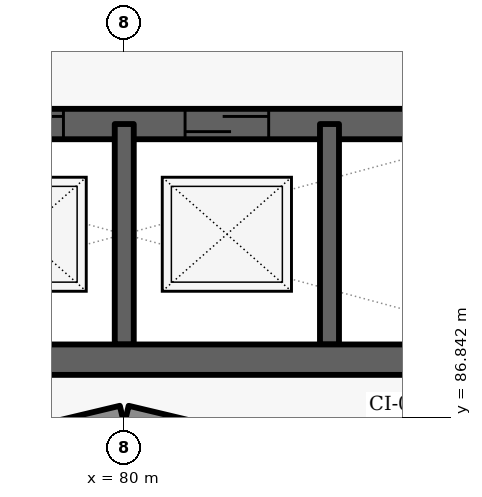
"""IFC4 building model, lengths in metres.
Left out: names, types, materials, properties, quantities, classifications, styles, units other than length and angle.
Written with IfcOpenShell. Run it as: python <this file> out.ifc"""

import sys

from ifc_helpers import new_model, si_unit, direction, frame, frame_2d, origin, place, context, subcontext, project, spatial, rectangle, extrude, element, fill, save


model = new_model("IFC4")
c1 = context("Model", 3, precision=1e-05, world=origin(), true_north=direction((0.0, 1.0)))
c2 = subcontext(c1, "Body", "Model", "MODEL_VIEW")
j1 = project(units=[si_unit("LENGTHUNIT", "METRE"), si_unit("PLANEANGLEUNIT", "RADIAN")], contexts=[c1])
p1 = place(None, origin())
s1 = spatial("IfcSite", under=j1, at=p1, CompositionType="ELEMENT")
p2 = place(p1, origin())
s2 = spatial("IfcBuilding", under=s1, at=p2, CompositionType="ELEMENT")
p3 = place(p2, frame((0.0, 0.0, 67.8)))
s3 = spatial("IfcBuildingStorey", under=s2, at=p3, CompositionType="ELEMENT", Elevation=67.8)
for number, where, z_axis, x_axis in (
    (1, (76.814, 86.119, 0.0), (0.0, 0.0, 1.0), (0.973, 0.232, 0.0)),
    (2, (80.029, 86.872, 0.0), (0.0, 0.0, 1.0), (0.973, -0.232, 0.0)),
):
    element("IfcWall", number, at=place(p3, frame(where, z_axis=z_axis, x_axis=x_axis)), inside=s3, PredefinedType="SOLIDWALL", context=c2, shape_type="SweptSolid", body=[
        extrude(rectangle(XDim=3.246, YDim=0.25, at=frame_2d((1.623, 0.0))), origin(), (0.0, 0.0, 1.0), 2.05),
    ])
p4 = place(p3, frame((74.6, 90.7, -0.275), z_axis=(0.0, 0.0, 1.0), x_axis=(1.0, 0.0, 0.0)))
e3 = element("IfcWall", 3, at=p4, inside=s3, PredefinedType="SHEAR", context=c2, shape_type="SweptSolid", body=[
    extrude(rectangle(XDim=10.8, YDim=0.4, at=frame_2d((5.4, 0.0))), origin(), (0.0, 0.0, 1.0), 3.225),
])
p5 = place(p4, frame((0.8, 0.0, 0.275)))
e4 = element("IfcOpeningElement", 4, at=p5, cuts=e3, PredefinedType="OPENING", context=c2, shape_type="SweptSolid", body=[
    extrude(rectangle(XDim=1.1, YDim=2.1, at=frame_2d((0.55, 1.05))), frame((0.0, 0.21, 0.0), z_axis=(0.0, -1.0, 0.0), x_axis=(1.0, 0.0, 0.0)), (0.0, 0.0, 1.0), 0.42),
])
p6 = place(p4, frame((3.5, 0.0, 0.275)))
e5 = element("IfcOpeningElement", 5, at=p6, cuts=e3, PredefinedType="OPENING", context=c2, shape_type="SweptSolid", body=[
    extrude(rectangle(XDim=1.1, YDim=2.1, at=frame_2d((0.55, 1.05))), frame((0.0, 0.21, 0.0), z_axis=(0.0, -1.0, 0.0), x_axis=(1.0, 0.0, 0.0)), (0.0, 0.0, 1.0), 0.42),
])
p7 = place(p4, frame((6.2, 0.0, 0.275)))
e6 = element("IfcOpeningElement", 6, at=p7, cuts=e3, PredefinedType="OPENING", context=c2, shape_type="SweptSolid", body=[
    extrude(rectangle(XDim=1.1, YDim=2.1, at=frame_2d((0.55, 1.05))), frame((0.0, 0.21, 0.0), z_axis=(0.0, -1.0, 0.0), x_axis=(1.0, 0.0, 0.0)), (0.0, 0.0, 1.0), 0.42),
])
for number, where, z_axis, x_axis in (
    (7, (80.0, 87.8, -0.275), (0.0, 0.0, 1.0), (0.0, 1.0, 0.0)),
    (8, (82.7, 87.8, -0.275), (0.0, 0.0, 1.0), (0.0, 1.0, 0.0)),
):
    element("IfcWall", number, at=place(p3, frame(where, z_axis=z_axis, x_axis=x_axis)), inside=s3, PredefinedType="SHEAR", context=c2, shape_type="SweptSolid", body=[
        extrude(rectangle(XDim=2.9, YDim=0.25, at=frame_2d((1.45, 0.0))), origin(), (0.0, 0.0, 1.0), 3.225),
    ])
p8 = place(p3, frame((72.004, 87.6, -0.275), z_axis=(0.0, 0.0, 1.0), x_axis=(1.0, 0.0, 0.0)))
e9 = element("IfcWall", 9, at=p8, inside=s3, PredefinedType="SHEAR", context=c2, shape_type="SweptSolid", body=[
    extrude(rectangle(XDim=15.992, YDim=0.4, at=frame_2d((7.996, 0.0))), origin(), (0.0, 0.0, 1.0), 3.225),
])
p9 = place(p6, origin())
e10 = element("IfcDoor", 10, at=p9, inside=s3, OperationType="SLIDING_TO_LEFT", PredefinedType="DOOR", context=c2, shape_type="SweptSolid", body=[
    extrude(rectangle(XDim=1.1, YDim=2.1, at=frame_2d((0.55, 1.05))), frame((0.0, 0.025, 0.0), z_axis=(0.0, -1.0, 0.0), x_axis=(1.0, 0.0, 0.0)), (0.0, 0.0, 1.0), 0.05),
])
fill(e5, e10)
p10 = place(p7, origin())
e11 = element("IfcDoor", 11, at=p10, inside=s3, OperationType="SLIDING_TO_LEFT", PredefinedType="DOOR", context=c2, shape_type="SweptSolid", body=[
    extrude(rectangle(XDim=1.1, YDim=2.1, at=frame_2d((0.55, 1.05))), frame((0.0, 0.025, 0.0), z_axis=(0.0, -1.0, 0.0), x_axis=(1.0, 0.0, 0.0)), (0.0, 0.0, 1.0), 0.05),
])
fill(e6, e11)
save(model, sys.argv[1])
